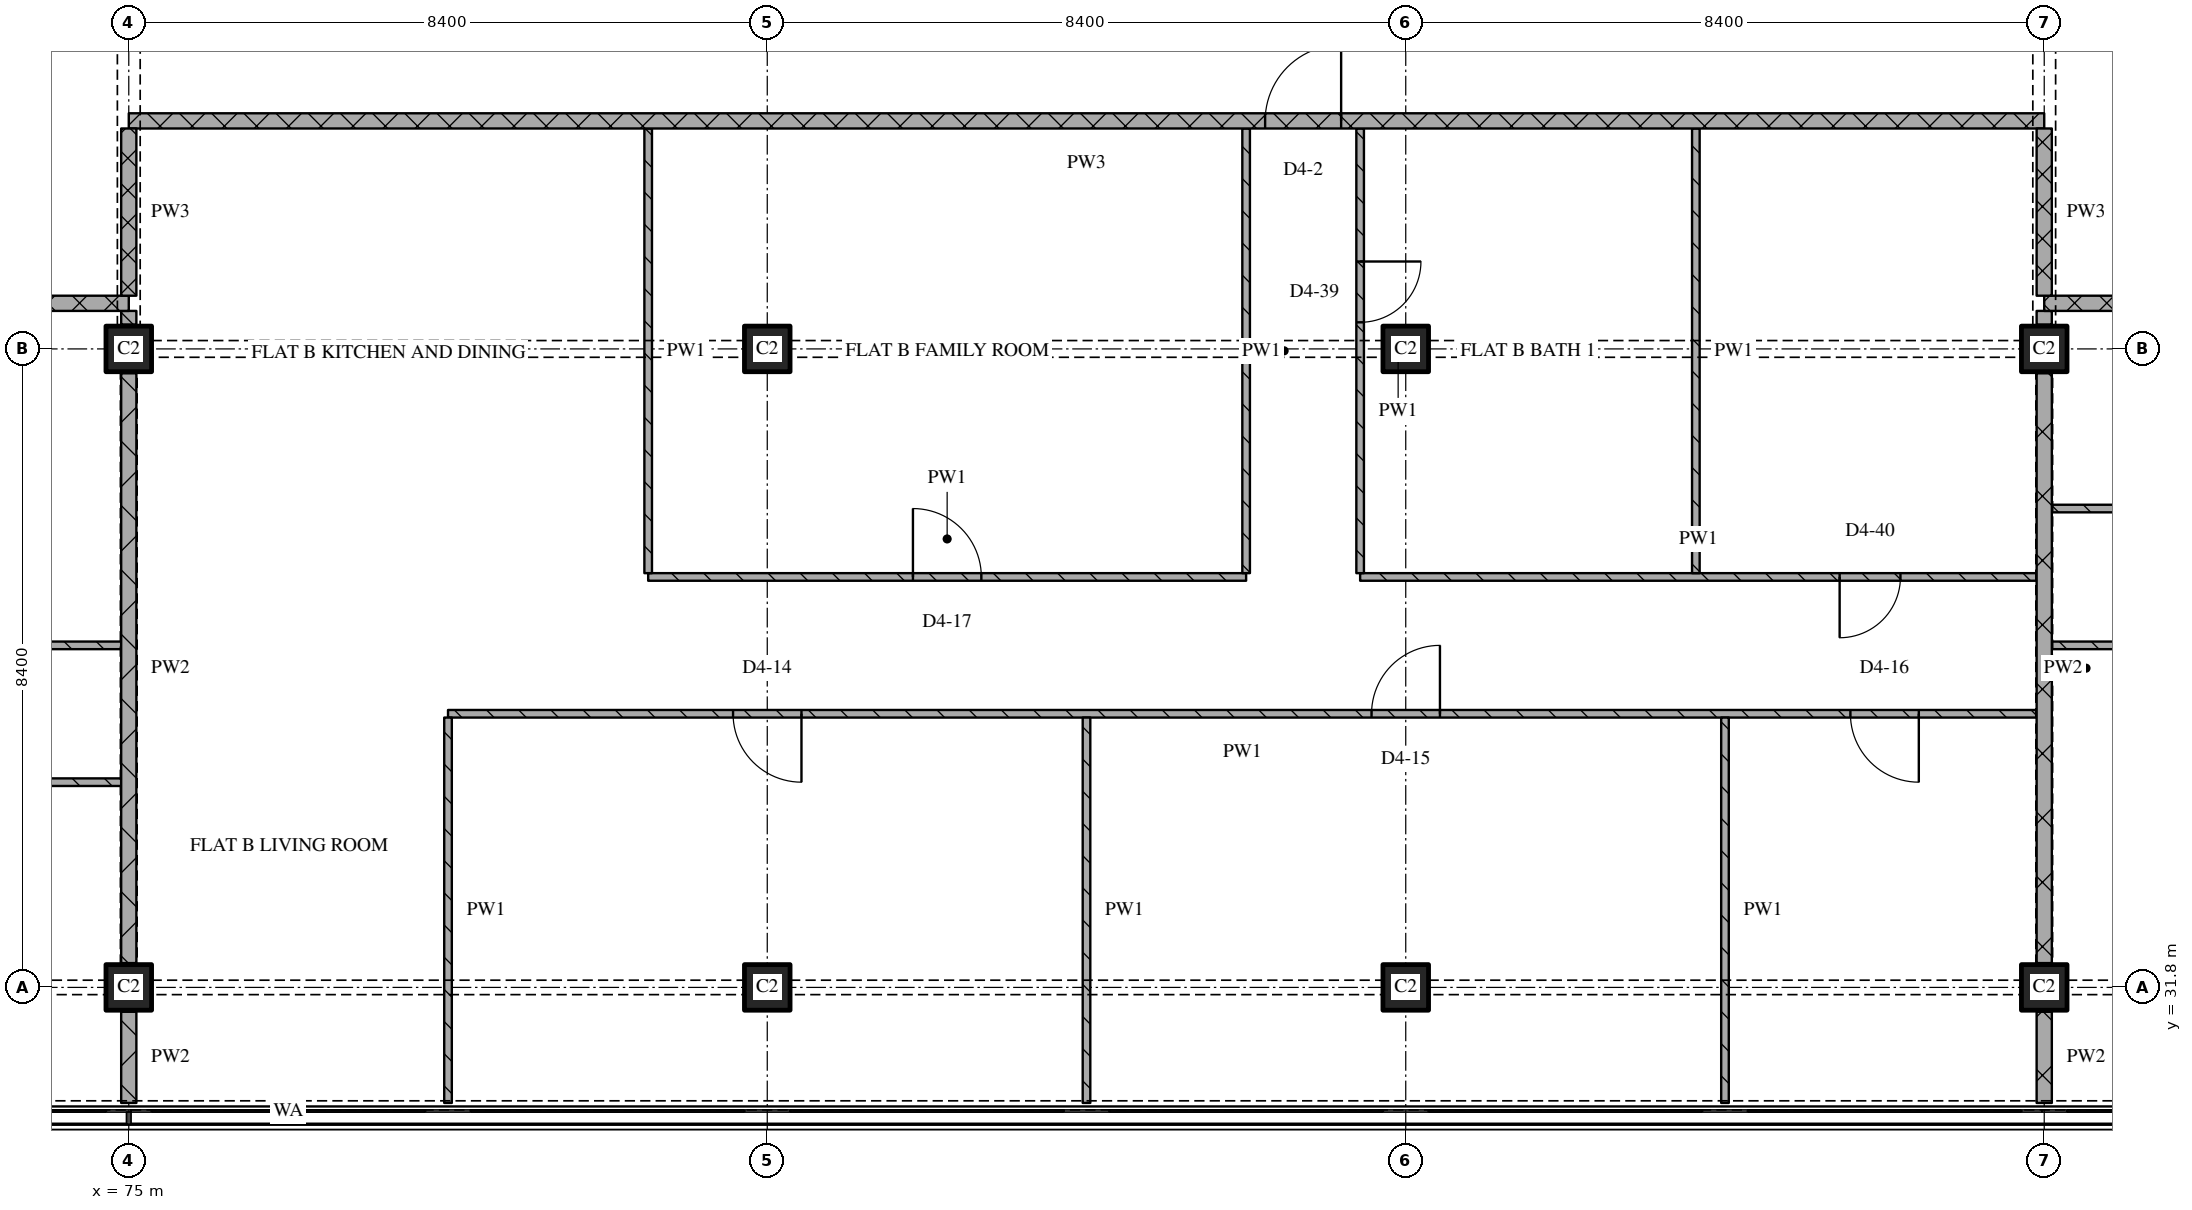
"""IFC4 building model, lengths in metres.
Left out: names, types, materials, properties, quantities, classifications, styles, units other than length and angle.
Written with IfcOpenShell. Run it as: python <this file> out.ifc"""

import sys

from ifc_helpers import new_model, si_unit, direction, frame, frame_2d, origin, origin_2d, place, context, subcontext, project, spatial, rectangle, extrude, element, fill, save


model = new_model("IFC4")
c1 = context("Model", 3, precision=1e-05, world=origin(), true_north=direction((0.0, 1.0)))
c2 = subcontext(c1, "Body", "Model", "MODEL_VIEW")
j1 = project(units=[si_unit("LENGTHUNIT", "METRE"), si_unit("PLANEANGLEUNIT", "RADIAN")], contexts=[c1])
p1 = place(None, origin())
s1 = spatial("IfcSite", under=j1, at=p1, CompositionType="ELEMENT")
p2 = place(p1, origin())
s2 = spatial("IfcBuilding", under=s1, at=p2, CompositionType="ELEMENT")
p3 = place(p2, frame((0.0, 0.0, 245.1)))
s3 = spatial("IfcBuildingStorey", under=s2, at=p3, CompositionType="ELEMENT", Elevation=245.1)
for number, where, z_axis, x_axis in (
    (1, (75.0, 31.8, 0.0), (0.0, 0.0, 1.0), (1.0, 0.0, 0.0)),
    (2, (75.0, 40.2, 0.0), (0.0, 0.0, 1.0), (1.0, 0.0, 0.0)),
    (3, (83.4, 31.8, 0.0), (0.0, 0.0, 1.0), (1.0, 0.0, 0.0)),
    (4, (83.4, 40.2, 0.0), (0.0, 0.0, 1.0), (1.0, 0.0, 0.0)),
    (5, (91.8, 31.8, 0.0), (0.0, 0.0, 1.0), (1.0, 0.0, 0.0)),
    (6, (91.8, 40.2, 0.0), (0.0, 0.0, 1.0), (1.0, 0.0, 0.0)),
    (7, (100.2, 31.8, 0.0), (0.0, 0.0, 1.0), (1.0, 0.0, 0.0)),
    (8, (100.2, 40.2, 0.0), (0.0, 0.0, 1.0), (1.0, 0.0, 0.0)),
):
    element("IfcColumn", number, at=place(p3, frame(where, z_axis=z_axis, x_axis=x_axis)), inside=s3, PredefinedType="COLUMN", context=c2, shape_type="SweptSolid", body=[
        extrude(rectangle(XDim=0.6, YDim=0.6, at=origin_2d()), origin(), (0.0, 0.0, 1.0), 3.6),
    ])
p4 = place(p3, frame((74.9, 34.5, 0.0), z_axis=(0.0, 0.0, 1.0), x_axis=(-1.0, 0.0, 0.0)))
e9 = element("IfcWall", 9, at=p4, inside=s3, PredefinedType="PARTITIONING", context=c2, shape_type="SweptSolid", body=[
    extrude(rectangle(XDim=16.7, YDim=0.1, at=frame_2d((8.35, 0.0))), origin(), (0.0, 0.0, 1.0), 3.32),
])
p5 = place(p4, frame((3.65, 0.0, 0.0)))
e10 = element("IfcOpeningElement", 10, at=p5, cuts=e9, PredefinedType="OPENING", context=c2, shape_type="SweptSolid", body=[
    extrude(rectangle(XDim=0.9, YDim=2.1, at=frame_2d((0.45, 1.05))), frame((0.0, 0.06, 0.0), z_axis=(0.0, -1.0, 0.0), x_axis=(1.0, 0.0, 0.0)), (0.0, 0.0, 1.0), 0.12),
])
p6 = place(p4, frame((12.05, 0.0, 0.0)))
e11 = element("IfcOpeningElement", 11, at=p6, cuts=e9, PredefinedType="OPENING", context=c2, shape_type="SweptSolid", body=[
    extrude(rectangle(XDim=0.9, YDim=2.1, at=frame_2d((0.45, 1.05))), frame((0.0, 0.06, 0.0), z_axis=(0.0, -1.0, 0.0), x_axis=(1.0, 0.0, 0.0)), (0.0, 0.0, 1.0), 0.12),
])
p7 = place(p3, frame((100.1, 35.4, 0.0), z_axis=(0.0, 0.0, 1.0), x_axis=(-1.0, 0.0, 0.0)))
e12 = element("IfcWall", 12, at=p7, inside=s3, PredefinedType="PARTITIONING", context=c2, shape_type="SweptSolid", body=[
    extrude(rectangle(XDim=20.9, YDim=0.1, at=frame_2d((10.45, 0.0))), origin(), (0.0, 0.0, 1.0), 3.32),
])
p8 = place(p7, frame((1.55, 0.0, 0.0)))
e13 = element("IfcOpeningElement", 13, at=p8, cuts=e12, PredefinedType="OPENING", context=c2, shape_type="SweptSolid", body=[
    extrude(rectangle(XDim=0.9, YDim=2.1, at=frame_2d((0.45, 1.05))), frame((0.0, 0.06, 0.0), z_axis=(0.0, -1.0, 0.0), x_axis=(1.0, 0.0, 0.0)), (0.0, 0.0, 1.0), 0.12),
])
p9 = place(p7, frame((7.85, 0.0, 0.0)))
e14 = element("IfcOpeningElement", 14, at=p9, cuts=e12, PredefinedType="OPENING", context=c2, shape_type="SweptSolid", body=[
    extrude(rectangle(XDim=0.9, YDim=2.1, at=frame_2d((0.45, 1.05))), frame((0.0, 0.06, 0.0), z_axis=(0.0, -1.0, 0.0), x_axis=(1.0, 0.0, 0.0)), (0.0, 0.0, 1.0), 0.12),
])
p10 = place(p7, frame((16.25, 0.0, 0.0)))
e15 = element("IfcOpeningElement", 15, at=p10, cuts=e12, PredefinedType="OPENING", context=c2, shape_type="SweptSolid", body=[
    extrude(rectangle(XDim=0.9, YDim=2.1, at=frame_2d((0.45, 1.05))), frame((0.0, 0.06, 0.0), z_axis=(0.0, -1.0, 0.0), x_axis=(1.0, 0.0, 0.0)), (0.0, 0.0, 1.0), 0.12),
])
p11 = place(p3, frame((65.1, 36.3, 0.0), z_axis=(0.0, 0.0, 1.0), x_axis=(1.0, 0.0, 0.0)))
e16 = element("IfcWall", 16, at=p11, inside=s3, PredefinedType="PARTITIONING", context=c2, shape_type="SweptSolid", body=[
    extrude(rectangle(XDim=9.8, YDim=0.1, at=frame_2d((4.9, 0.0))), origin(), (0.0, 0.0, 1.0), 3.32),
])
p12 = place(p11, frame((6.8, 0.0, 0.0)))
e17 = element("IfcOpeningElement", 17, at=p12, cuts=e16, PredefinedType="OPENING", context=c2, shape_type="SweptSolid", body=[
    extrude(rectangle(XDim=0.8, YDim=2.1, at=frame_2d((0.4, 1.05))), frame((0.0, 0.06, 0.0), z_axis=(0.0, -1.0, 0.0), x_axis=(1.0, 0.0, 0.0)), (0.0, 0.0, 1.0), 0.12),
])
p13 = place(p3, frame((112.8, 36.3, 0.0), z_axis=(0.0, 0.0, 1.0), x_axis=(-1.0, 0.0, 0.0)))
e18 = element("IfcWall", 18, at=p13, inside=s3, PredefinedType="PARTITIONING", context=c2, shape_type="SweptSolid", body=[
    extrude(rectangle(XDim=12.5, YDim=0.1, at=frame_2d((6.25, 0.0))), origin(), (0.0, 0.0, 1.0), 3.32),
])
p14 = place(p13, frame((10.05, 0.0, 0.0)))
e19 = element("IfcOpeningElement", 19, at=p14, cuts=e18, PredefinedType="OPENING", context=c2, shape_type="SweptSolid", body=[
    extrude(rectangle(XDim=0.9, YDim=2.1, at=frame_2d((0.45, 1.05))), frame((0.0, 0.06, 0.0), z_axis=(0.0, -1.0, 0.0), x_axis=(1.0, 0.0, 0.0)), (0.0, 0.0, 1.0), 0.12),
])
p15 = place(p3, frame((81.833, 37.2, 0.0), z_axis=(0.0, 0.0, 1.0), x_axis=(1.0, 0.0, 0.0)))
e20 = element("IfcWall", 20, at=p15, inside=s3, PredefinedType="PARTITIONING", context=c2, shape_type="SweptSolid", body=[
    extrude(rectangle(XDim=7.867, YDim=0.1, at=frame_2d((3.933, 0.0))), origin(), (0.0, 0.0, 1.0), 3.32),
])
p16 = place(p15, frame((3.483, 0.0, 0.0)))
e21 = element("IfcOpeningElement", 21, at=p16, cuts=e20, PredefinedType="OPENING", context=c2, shape_type="SweptSolid", body=[
    extrude(rectangle(XDim=0.9, YDim=2.1, at=frame_2d((0.45, 1.05))), frame((0.0, 0.06, 0.0), z_axis=(0.0, -1.0, 0.0), x_axis=(1.0, 0.0, 0.0)), (0.0, 0.0, 1.0), 0.12),
])
p17 = place(p3, frame((91.2, 37.2, 0.0), z_axis=(0.0, 0.0, 1.0), x_axis=(1.0, 0.0, 0.0)))
e22 = element("IfcWall", 22, at=p17, inside=s3, PredefinedType="PARTITIONING", context=c2, shape_type="SweptSolid", body=[
    extrude(rectangle(XDim=8.9, YDim=0.1, at=frame_2d((4.45, 0.0))), origin(), (0.0, 0.0, 1.0), 3.32),
])
p18 = place(p17, frame((6.308, 0.0, 0.0)))
e23 = element("IfcOpeningElement", 23, at=p18, cuts=e22, PredefinedType="OPENING", context=c2, shape_type="SweptSolid", body=[
    extrude(rectangle(XDim=0.8, YDim=2.1, at=frame_2d((0.4, 1.05))), frame((0.0, 0.06, 0.0), z_axis=(0.0, -1.0, 0.0), x_axis=(1.0, 0.0, 0.0)), (0.0, 0.0, 1.0), 0.12),
])
p19 = place(p3, frame((100.3, 38.1, 0.0), z_axis=(0.0, 0.0, 1.0), x_axis=(1.0, 0.0, 0.0)))
e24 = element("IfcWall", 24, at=p19, inside=s3, PredefinedType="PARTITIONING", context=c2, shape_type="SweptSolid", body=[
    extrude(rectangle(XDim=8.6, YDim=0.1, at=frame_2d((4.3, 0.0))), origin(), (0.0, 0.0, 1.0), 3.32),
])
p20 = place(p19, frame((1.75, 0.0, 0.0)))
e25 = element("IfcOpeningElement", 25, at=p20, cuts=e24, PredefinedType="OPENING", context=c2, shape_type="SweptSolid", body=[
    extrude(rectangle(XDim=0.8, YDim=2.1, at=frame_2d((0.4, 1.05))), frame((0.0, 0.06, 0.0), z_axis=(0.0, -1.0, 0.0), x_axis=(1.0, 0.0, 0.0)), (0.0, 0.0, 1.0), 0.12),
])
p21 = place(p3, frame((75.0, 40.8, 0.0), z_axis=(0.0, 0.0, 1.0), x_axis=(-1.0, 0.0, 0.0)))
e26 = element("IfcWall", 26, at=p21, inside=s3, PredefinedType="PARTITIONING", context=c2, shape_type="SweptSolid", body=[
    extrude(rectangle(XDim=24.38, YDim=0.2, at=frame_2d((12.19, 0.0))), origin(), (0.0, 0.0, 1.0), 3.32),
])
p22 = place(p21, frame((10.15, 0.0, 0.0)))
e27 = element("IfcOpeningElement", 27, at=p22, cuts=e26, PredefinedType="OPENING", context=c2, shape_type="SweptSolid", body=[
    extrude(rectangle(XDim=1.0, YDim=2.1, at=frame_2d((0.5, 1.05))), frame((0.0, 0.11, 0.0), z_axis=(0.0, -1.0, 0.0), x_axis=(1.0, 0.0, 0.0)), (0.0, 0.0, 1.0), 0.22),
])
p23 = place(p3, frame((124.58, 40.8, 0.0), z_axis=(0.0, 0.0, 1.0), x_axis=(-1.0, 0.0, 0.0)))
e28 = element("IfcWall", 28, at=p23, inside=s3, PredefinedType="PARTITIONING", context=c2, shape_type="SweptSolid", body=[
    extrude(rectangle(XDim=24.38, YDim=0.2, at=frame_2d((12.19, 0.0))), origin(), (0.0, 0.0, 1.0), 3.32),
])
p24 = place(p23, frame((14.43, 0.0, 0.0)))
e29 = element("IfcOpeningElement", 29, at=p24, cuts=e28, PredefinedType="OPENING", context=c2, shape_type="SweptSolid", body=[
    extrude(rectangle(XDim=1.0, YDim=2.1, at=frame_2d((0.5, 1.05))), frame((0.0, 0.11, 0.0), z_axis=(0.0, -1.0, 0.0), x_axis=(1.0, 0.0, 0.0)), (0.0, 0.0, 1.0), 0.22),
])
p25 = place(p3, frame((100.2, 43.2, 0.0), z_axis=(0.0, 0.0, 1.0), x_axis=(-1.0, 0.0, 0.0)))
e30 = element("IfcWall", 30, at=p25, inside=s3, PredefinedType="PARTITIONING", context=c2, shape_type="SweptSolid", body=[
    extrude(rectangle(XDim=25.2, YDim=0.2, at=frame_2d((12.6, 0.0))), origin(), (0.0, 0.0, 1.0), 3.32),
])
p26 = place(p25, frame((9.25, 0.0, 0.0)))
e31 = element("IfcOpeningElement", 31, at=p26, cuts=e30, PredefinedType="OPENING", context=c2, shape_type="SweptSolid", body=[
    extrude(rectangle(XDim=1.0, YDim=2.1, at=frame_2d((0.5, 1.05))), frame((0.0, 0.11, 0.0), z_axis=(0.0, -1.0, 0.0), x_axis=(1.0, 0.0, 0.0)), (0.0, 0.0, 1.0), 0.22),
])
p27 = place(p3, frame((75.0, 43.1, 0.0), z_axis=(0.0, 0.0, 1.0), x_axis=(0.0, -1.0, 0.0)))
e32 = element("IfcWall", 32, at=p27, inside=s3, PredefinedType="PARTITIONING", context=c2, shape_type="SweptSolid", body=[
    extrude(rectangle(XDim=2.2, YDim=0.2, at=frame_2d((1.1, 0.0))), origin(), (0.0, 0.0, 1.0), 2.53),
])
p28 = place(p3, frame((75.0, 31.48, 0.0), z_axis=(0.0, 0.0, 1.0), x_axis=(0.0, -1.0, 0.0)))
e33 = element("IfcWall", 33, at=p28, inside=s3, PredefinedType="PARTITIONING", context=c2, shape_type="SweptSolid", body=[
    extrude(rectangle(XDim=1.2, YDim=0.2, at=frame_2d((0.6, 0.0))), origin(), (0.0, 0.0, 1.0), 3.32),
])
p29 = place(p3, frame((75.0, 39.88, 0.0), z_axis=(0.0, 0.0, 1.0), x_axis=(0.0, -1.0, 0.0)))
e34 = element("IfcWall", 34, at=p29, inside=s3, PredefinedType="PARTITIONING", context=c2, shape_type="SweptSolid", body=[
    extrude(rectangle(XDim=7.76, YDim=0.2, at=frame_2d((3.88, 0.0))), origin(), (0.0, 0.0, 1.0), 2.72),
])
p30 = place(p3, frame((75.0, 40.7, 0.0), z_axis=(0.0, 0.0, 1.0), x_axis=(0.0, -1.0, 0.0)))
e35 = element("IfcWall", 35, at=p30, inside=s3, PredefinedType="PARTITIONING", context=c2, shape_type="SweptSolid", body=[
    extrude(rectangle(XDim=0.18, YDim=0.2, at=frame_2d((0.09, 0.0))), origin(), (0.0, 0.0, 1.0), 3.32),
])
p31 = place(p3, frame((79.2, 35.35, 0.0), z_axis=(0.0, 0.0, 1.0), x_axis=(0.0, -1.0, 0.0)))
e36 = element("IfcWall", 36, at=p31, inside=s3, PredefinedType="PARTITIONING", context=c2, shape_type="SweptSolid", body=[
    extrude(rectangle(XDim=5.07, YDim=0.1, at=frame_2d((2.535, 0.0))), origin(), (0.0, 0.0, 1.0), 3.32),
])
p32 = place(p3, frame((81.833, 43.1, 0.0), z_axis=(0.0, 0.0, 1.0), x_axis=(0.0, -1.0, 0.0)))
e37 = element("IfcWall", 37, at=p32, inside=s3, PredefinedType="PARTITIONING", context=c2, shape_type="SweptSolid", body=[
    extrude(rectangle(XDim=5.85, YDim=0.1, at=frame_2d((2.925, 0.0))), origin(), (0.0, 0.0, 1.0), 3.32),
])
p33 = place(p3, frame((87.6, 35.35, 0.0), z_axis=(0.0, 0.0, 1.0), x_axis=(0.0, -1.0, 0.0)))
e38 = element("IfcWall", 38, at=p33, inside=s3, PredefinedType="PARTITIONING", context=c2, shape_type="SweptSolid", body=[
    extrude(rectangle(XDim=5.07, YDim=0.1, at=frame_2d((2.535, 0.0))), origin(), (0.0, 0.0, 1.0), 3.32),
])
p34 = place(p3, frame((89.7, 43.1, 0.0), z_axis=(0.0, 0.0, 1.0), x_axis=(0.0, -1.0, 0.0)))
e39 = element("IfcWall", 39, at=p34, inside=s3, PredefinedType="PARTITIONING", context=c2, shape_type="SweptSolid", body=[
    extrude(rectangle(XDim=5.85, YDim=0.1, at=frame_2d((2.925, 0.0))), origin(), (0.0, 0.0, 1.0), 3.32),
])
p35 = place(p3, frame((91.2, 43.1, 0.0), z_axis=(0.0, 0.0, 1.0), x_axis=(0.0, -1.0, 0.0)))
e40 = element("IfcWall", 40, at=p35, inside=s3, PredefinedType="PARTITIONING", context=c2, shape_type="SweptSolid", body=[
    extrude(rectangle(XDim=5.85, YDim=0.1, at=frame_2d((2.925, 0.0))), origin(), (0.0, 0.0, 1.0), 3.32),
])
p36 = place(p35, frame((1.75, 0.0, 0.0)))
e41 = element("IfcOpeningElement", 41, at=p36, cuts=e40, PredefinedType="OPENING", context=c2, shape_type="SweptSolid", body=[
    extrude(rectangle(XDim=0.8, YDim=2.1, at=frame_2d((0.4, 1.05))), frame((0.0, 0.06, 0.0), z_axis=(0.0, -1.0, 0.0), x_axis=(1.0, 0.0, 0.0)), (0.0, 0.0, 1.0), 0.12),
])
p37 = place(p3, frame((95.617, 43.1, 0.0), z_axis=(0.0, 0.0, 1.0), x_axis=(0.0, -1.0, 0.0)))
e42 = element("IfcWall", 42, at=p37, inside=s3, PredefinedType="PARTITIONING", context=c2, shape_type="SweptSolid", body=[
    extrude(rectangle(XDim=5.85, YDim=0.1, at=frame_2d((2.925, 0.0))), origin(), (0.0, 0.0, 1.0), 3.32),
])
p38 = place(p3, frame((96.0, 35.35, 0.0), z_axis=(0.0, 0.0, 1.0), x_axis=(0.0, -1.0, 0.0)))
e43 = element("IfcWall", 43, at=p38, inside=s3, PredefinedType="PARTITIONING", context=c2, shape_type="SweptSolid", body=[
    extrude(rectangle(XDim=5.07, YDim=0.1, at=frame_2d((2.535, 0.0))), origin(), (0.0, 0.0, 1.0), 3.32),
])
p39 = place(p3, frame((100.2, 43.1, 0.0), z_axis=(0.0, 0.0, 1.0), x_axis=(0.0, -1.0, 0.0)))
e44 = element("IfcWall", 44, at=p39, inside=s3, PredefinedType="PARTITIONING", context=c2, shape_type="SweptSolid", body=[
    extrude(rectangle(XDim=2.2, YDim=0.2, at=frame_2d((1.1, 0.0))), origin(), (0.0, 0.0, 1.0), 2.53),
])
p40 = place(p3, frame((100.2, 31.48, 0.0), z_axis=(0.0, 0.0, 1.0), x_axis=(0.0, -1.0, 0.0)))
e45 = element("IfcWall", 45, at=p40, inside=s3, PredefinedType="PARTITIONING", context=c2, shape_type="SweptSolid", body=[
    extrude(rectangle(XDim=1.2, YDim=0.2, at=frame_2d((0.6, 0.0))), origin(), (0.0, 0.0, 1.0), 3.32),
])
p41 = place(p3, frame((100.2, 39.88, 0.0), z_axis=(0.0, 0.0, 1.0), x_axis=(0.0, -1.0, 0.0)))
e46 = element("IfcWall", 46, at=p41, inside=s3, PredefinedType="PARTITIONING", context=c2, shape_type="SweptSolid", body=[
    extrude(rectangle(XDim=7.76, YDim=0.2, at=frame_2d((3.88, 0.0))), origin(), (0.0, 0.0, 1.0), 2.72),
])
p42 = place(p3, frame((100.2, 40.7, 0.0), z_axis=(0.0, 0.0, 1.0), x_axis=(0.0, -1.0, 0.0)))
e47 = element("IfcWall", 47, at=p42, inside=s3, PredefinedType="PARTITIONING", context=c2, shape_type="SweptSolid", body=[
    extrude(rectangle(XDim=0.18, YDim=0.2, at=frame_2d((0.09, 0.0))), origin(), (0.0, 0.0, 1.0), 3.32),
])
p43 = place(p8, origin())
e48 = element("IfcDoor", 48, at=p43, inside=s3, OperationType="SINGLE_SWING_LEFT", PredefinedType="DOOR", context=c2, shape_type="SweptSolid", body=[
    extrude(rectangle(XDim=0.9, YDim=2.1, at=frame_2d((0.45, 1.05))), frame((0.0, 0.025, 0.0), z_axis=(0.0, -1.0, 0.0), x_axis=(1.0, 0.0, 0.0)), (0.0, 0.0, 1.0), 0.05),
])
fill(e13, e48)
p44 = place(p9, origin())
e49 = element("IfcDoor", 49, at=p44, inside=s3, OperationType="SINGLE_SWING_RIGHT", PredefinedType="DOOR", context=c2, shape_type="SweptSolid", body=[
    extrude(rectangle(XDim=0.9, YDim=2.1, at=frame_2d((0.45, 1.05))), frame((0.0, 0.025, 0.0), z_axis=(0.0, -1.0, 0.0), x_axis=(1.0, 0.0, 0.0)), (0.0, 0.0, 1.0), 0.05),
])
fill(e14, e49)
p45 = place(p10, origin())
e50 = element("IfcDoor", 50, at=p45, inside=s3, OperationType="SINGLE_SWING_LEFT", PredefinedType="DOOR", context=c2, shape_type="SweptSolid", body=[
    extrude(rectangle(XDim=0.9, YDim=2.1, at=frame_2d((0.45, 1.05))), frame((0.0, 0.025, 0.0), z_axis=(0.0, -1.0, 0.0), x_axis=(1.0, 0.0, 0.0)), (0.0, 0.0, 1.0), 0.05),
])
fill(e15, e50)
p46 = place(p16, origin())
e51 = element("IfcDoor", 51, at=p46, inside=s3, OperationType="SINGLE_SWING_LEFT", PredefinedType="DOOR", context=c2, shape_type="SweptSolid", body=[
    extrude(rectangle(XDim=0.9, YDim=2.1, at=frame_2d((0.45, 1.05))), frame((0.0, 0.025, 0.0), z_axis=(0.0, -1.0, 0.0), x_axis=(1.0, 0.0, 0.0)), (0.0, 0.0, 1.0), 0.05),
])
fill(e21, e51)
p47 = place(p18, origin())
e52 = element("IfcDoor", 52, at=p47, inside=s3, OperationType="SINGLE_SWING_RIGHT", PredefinedType="DOOR", context=c2, shape_type="SweptSolid", body=[
    extrude(rectangle(XDim=0.8, YDim=2.1, at=frame_2d((0.4, 1.05))), frame((0.0, 0.025, 0.0), z_axis=(0.0, -1.0, 0.0), x_axis=(1.0, 0.0, 0.0)), (0.0, 0.0, 1.0), 0.05),
])
fill(e23, e52)
p48 = place(p26, origin())
e53 = element("IfcDoor", 53, at=p48, inside=s3, OperationType="SINGLE_SWING_RIGHT", PredefinedType="DOOR", context=c2, shape_type="SweptSolid", body=[
    extrude(rectangle(XDim=1.0, YDim=2.1, at=frame_2d((0.5, 1.05))), frame((0.0, 0.025, 0.0), z_axis=(0.0, -1.0, 0.0), x_axis=(1.0, 0.0, 0.0)), (0.0, 0.0, 1.0), 0.05),
])
fill(e31, e53)
p49 = place(p36, origin())
e54 = element("IfcDoor", 54, at=p49, inside=s3, OperationType="SINGLE_SWING_LEFT", PredefinedType="DOOR", context=c2, shape_type="SweptSolid", body=[
    extrude(rectangle(XDim=0.8, YDim=2.1, at=frame_2d((0.4, 1.05))), frame((0.0, 0.025, 0.0), z_axis=(0.0, -1.0, 0.0), x_axis=(1.0, 0.0, 0.0)), (0.0, 0.0, 1.0), 0.05),
])
fill(e41, e54)
save(model, sys.argv[1])
